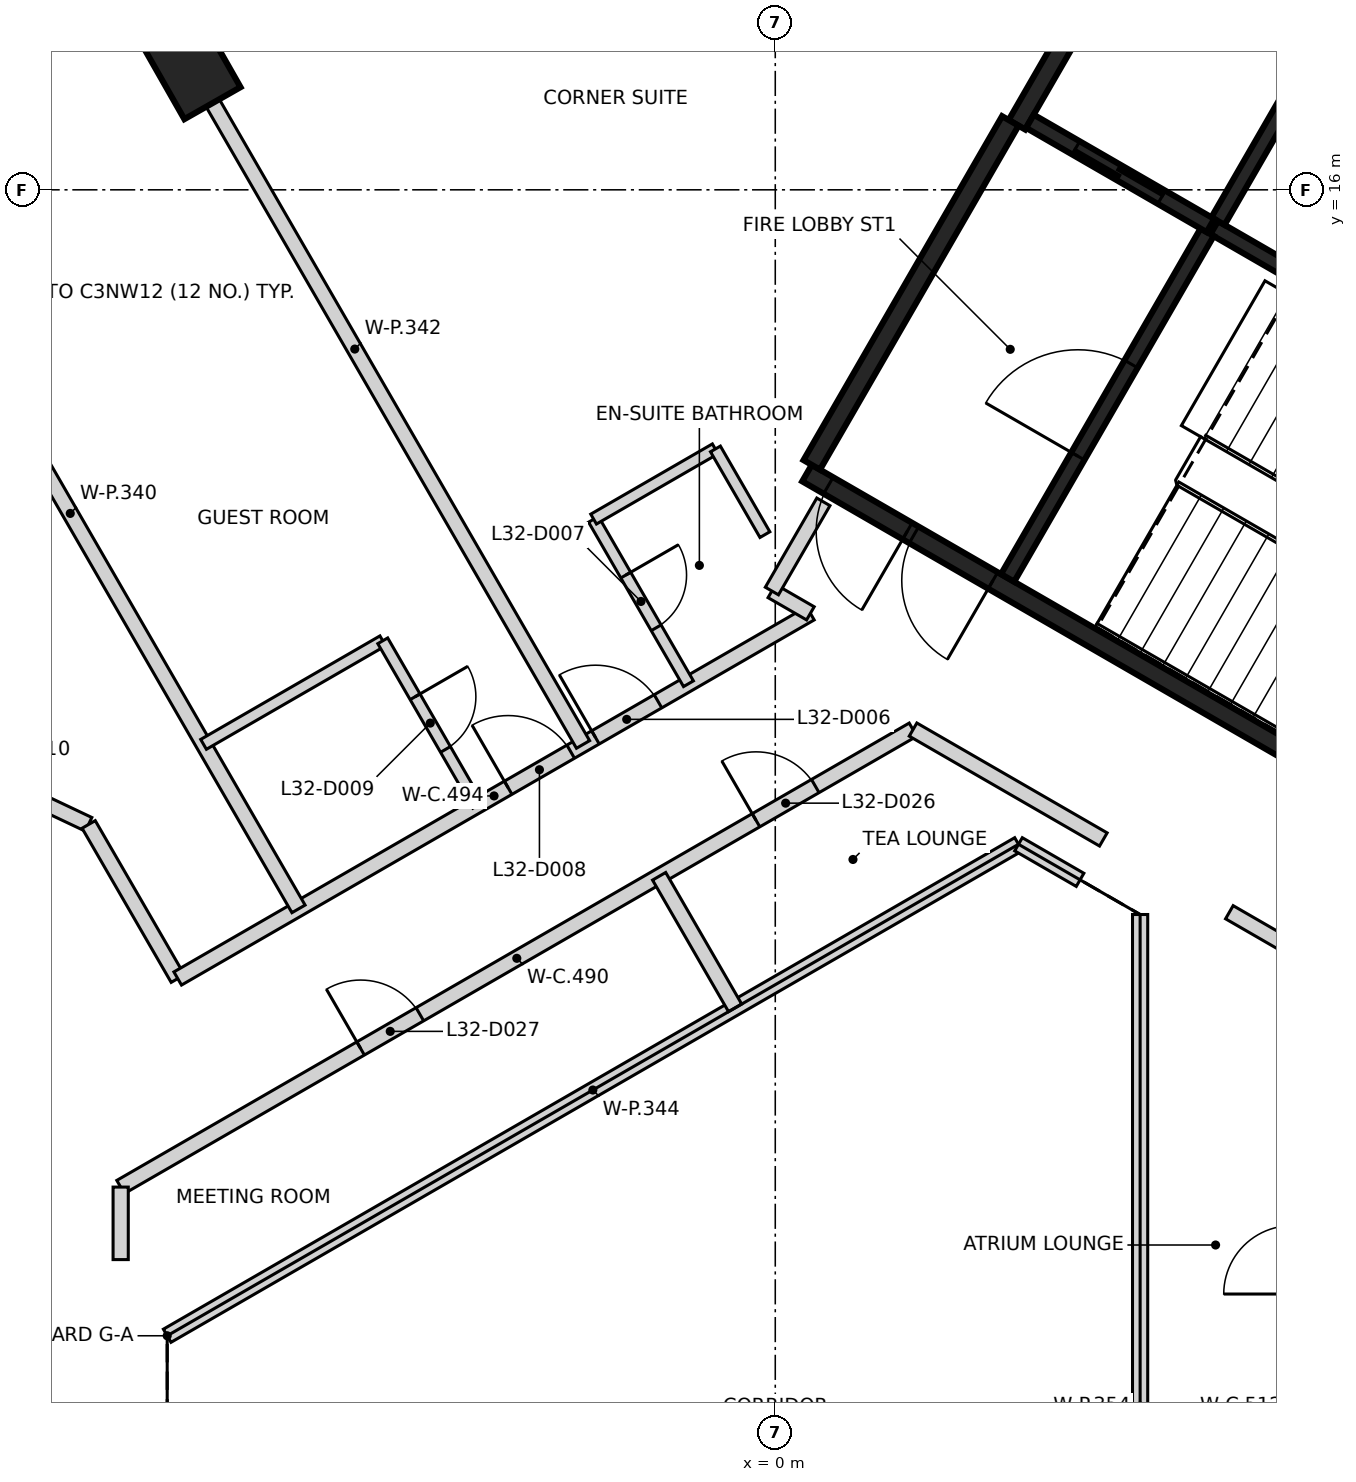
"""IFC4 building model, lengths in metres.
Left out: names, types, materials, properties, quantities, classifications, styles, units other than length and angle.
Written with IfcOpenShell. Run it as: python <this file> out.ifc"""

import sys

from ifc_helpers import new_model, si_unit, direction, frame, frame_2d, origin, origin_2d, place, context, subcontext, project, spatial, rectangle, extrude, element, fill, save


model = new_model("IFC4")
c1 = context("Model", 3, precision=1e-05, world=origin(), true_north=direction((0.0, 1.0)))
c2 = subcontext(c1, "Body", "Model", "MODEL_VIEW")
j1 = project(units=[si_unit("LENGTHUNIT", "METRE"), si_unit("PLANEANGLEUNIT", "RADIAN")], contexts=[c1])
p1 = place(None, origin())
s1 = spatial("IfcSite", under=j1, at=p1, CompositionType="ELEMENT")
p2 = place(p1, origin())
s2 = spatial("IfcBuilding", under=s1, at=p2, CompositionType="ELEMENT")
p3 = place(p2, frame((0.0, 0.0, 132.4)))
s3 = spatial("IfcBuildingStorey", under=s2, at=p3, CompositionType="ELEMENT", Elevation=132.4)
p4 = place(p3, frame((-7.714, 17.683, -0.4), z_axis=(0.0, 0.0, 1.0), x_axis=(-0.494656467983, 0.869088590813, 0.0)))
e1 = element("IfcColumn", 1, at=p4, inside=s3, PredefinedType="COLUMN", context=c2, shape_type="SweptSolid", body=[
    extrude(rectangle(XDim=1.25, YDim=0.85, at=origin_2d()), origin(), (0.0, 0.0, 1.0), 3.6),
])
p5 = place(p3, frame((10.42, 6.498, 0.0), z_axis=(0.0, 0.0, 1.0), x_axis=(-0.866021906294, 0.500006057782, 0.0)))
e2 = element("IfcWall", 2, at=p5, inside=s3, PredefinedType="SHEAR", context=c2, shape_type="SweptSolid", body=[
    extrude(rectangle(XDim=11.55, YDim=0.25, at=frame_2d((5.775, 0.0))), origin(), (0.0, 0.0, 1.0), 3.2),
])
p6 = place(p5, frame((10.025, 0.0, 0.0)))
e3 = element("IfcOpeningElement", 3, at=p6, cuts=e2, PredefinedType="OPENING", context=c2, shape_type="SweptSolid", body=[
    extrude(rectangle(XDim=1.2, YDim=2.1, at=frame_2d((0.6, 1.05))), frame((0.0, 0.135, 0.0), z_axis=(0.0, -1.0, 0.0), x_axis=(1.0, 0.0, 0.0)), (0.0, 0.0, 1.0), 0.27),
])
p7 = place(p5, frame((8.725, 0.0, 0.0)))
e4 = element("IfcOpeningElement", 4, at=p7, cuts=e2, PredefinedType="OPENING", context=c2, shape_type="SweptSolid", body=[
    extrude(rectangle(XDim=1.2, YDim=2.1, at=frame_2d((0.6, 1.05))), frame((0.0, 0.135, 0.0), z_axis=(0.0, -1.0, 0.0), x_axis=(1.0, 0.0, 0.0)), (0.0, 0.0, 1.0), 0.27),
])
p8 = place(p3, frame((3.179, 16.856, 0.0), z_axis=(0.0, 0.0, 1.0), x_axis=(0.500004234368, 0.866022959057, 0.0)))
e5 = element("IfcWall", 5, at=p8, inside=s3, PredefinedType="SHEAR", context=c2, shape_type="SweptSolid", body=[
    extrude(rectangle(XDim=6.25, YDim=0.25, at=frame_2d((3.125, 0.0))), origin(), (0.0, 0.0, 1.0), 3.2),
])
p9 = place(p3, frame((0.48, 12.381, 0.0), z_axis=(0.0, 0.0, 1.0), x_axis=(0.49999885962, 0.866026062182, 0.0)))
e6 = element("IfcWall", 6, at=p9, inside=s3, PredefinedType="SHEAR", context=c2, shape_type="SweptSolid", body=[
    extrude(rectangle(XDim=5.225, YDim=0.25, at=frame_2d((2.612, 0.0))), origin(), (0.0, 0.0, 1.0), 3.2),
])
p10 = place(p3, frame((5.775, 15.502, 0.0), z_axis=(0.0, 0.0, 1.0), x_axis=(0.866020080793, -0.500009219579, 0.0)))
e7 = element("IfcWall", 7, at=p10, inside=s3, PredefinedType="SHEAR", context=c2, shape_type="SweptSolid", body=[
    extrude(rectangle(XDim=5.699, YDim=0.2, at=frame_2d((2.85, 0.0))), origin(), (0.0, 0.0, 1.0), 3.2),
])
p11 = place(p3, frame((3.057, 10.895, 0.0), z_axis=(0.0, 0.0, 1.0), x_axis=(0.499989418164, 0.866031513124, 0.0)))
e8 = element("IfcWall", 8, at=p11, inside=s3, PredefinedType="SHEAR", context=c2, shape_type="SweptSolid", body=[
    extrude(rectangle(XDim=5.251, YDim=0.2, at=frame_2d((2.625, 0.0))), origin(), (0.0, 0.0, 1.0), 3.2),
])
p12 = place(p11, frame((1.849, 0.0, 0.0)))
e9 = element("IfcOpeningElement", 9, at=p12, cuts=e8, PredefinedType="OPENING", context=c2, shape_type="SweptSolid", body=[
    extrude(rectangle(XDim=1.4, YDim=2.1, at=frame_2d((0.7, 1.05))), frame((0.0, 0.11, 0.0), z_axis=(0.0, -1.0, 0.0), x_axis=(1.0, 0.0, 0.0)), (0.0, 0.0, 1.0), 0.22),
])
p13 = place(p3, frame((7.199, 17.97, 0.0), z_axis=(0.0, 0.0, 1.0), x_axis=(-0.499968400327, -0.866043647095, 0.0)))
e10 = element("IfcWall", 10, at=p13, inside=s3, PredefinedType="SHEAR", context=c2, shape_type="SweptSolid", body=[
    extrude(rectangle(XDim=2.75, YDim=0.2, at=frame_2d((1.375, 0.0))), origin(), (0.0, 0.0, 1.0), 3.2),
])
p14 = place(p3, frame((5.725, 15.531, 0.0), z_axis=(0.0, 0.0, 1.0), x_axis=(-0.866037306777, 0.499979382845, 0.0)))
e11 = element("IfcWall", 11, at=p14, inside=s3, PredefinedType="SHEAR", context=c2, shape_type="SweptSolid", body=[
    extrude(rectangle(XDim=2.742, YDim=0.2, at=frame_2d((1.371, 0.0))), origin(), (0.0, 0.0, 1.0), 3.2),
])
p15 = place(p14, frame((0.743, 0.0, 0.0)))
e12 = element("IfcOpeningElement", 12, at=p15, cuts=e11, PredefinedType="OPENING", context=c2, shape_type="SweptSolid", body=[
    extrude(rectangle(XDim=1.3, YDim=2.1, at=frame_2d((0.65, 1.05))), frame((0.0, 0.11, 0.0), z_axis=(0.0, -1.0, 0.0), x_axis=(1.0, 0.0, 0.0)), (0.0, 0.0, 1.0), 0.22),
])
p16 = place(p3, frame((-10.141, 8.176, 0.0), z_axis=(0.0, 0.0, 1.0), x_axis=(0.903904169039, -0.427735026849, 0.0)))
e13 = element("IfcWall", 13, at=p16, inside=s3, PredefinedType="PARTITIONING", context=c2, shape_type="SweptSolid", body=[
    extrude(rectangle(XDim=1.225, YDim=0.2, at=frame_2d((0.612, 0.0))), origin(), (0.0, 0.0, 1.0), 3.2),
])
p17 = place(p3, frame((-9.033, 7.651, 0.0), z_axis=(0.0, 0.0, 1.0), x_axis=(0.500354010599, -0.865820919173, 0.0)))
e14 = element("IfcWall", 14, at=p17, inside=s3, PredefinedType="PARTITIONING", context=c2, shape_type="SweptSolid", body=[
    extrude(rectangle(XDim=2.342, YDim=0.2, at=frame_2d((1.171, 0.0))), origin(), (0.0, 0.0, 1.0), 3.2),
])
p18 = place(p3, frame((-8.613, 2.881, 0.0), z_axis=(0.0, 0.0, 1.0), x_axis=(0.866103179807, 0.499865263774, 0.0)))
e15 = element("IfcWall", 15, at=p18, inside=s3, PredefinedType="PARTITIONING", context=c2, shape_type="SweptSolid", body=[
    extrude(rectangle(XDim=12.036, YDim=0.2, at=frame_2d((6.018, 0.0))), origin(), (0.0, 0.0, 1.0), 3.2),
])
p19 = place(p18, frame((9.652, 0.0, 0.0)))
e16 = element("IfcOpeningElement", 16, at=p19, cuts=e15, PredefinedType="OPENING", context=c2, shape_type="SweptSolid", body=[
    extrude(rectangle(XDim=0.9, YDim=2.1, at=frame_2d((0.45, 1.05))), frame((0.0, 0.11, 0.0), z_axis=(0.0, -1.0, 0.0), x_axis=(1.0, 0.0, 0.0)), (0.0, 0.0, 1.0), 0.22),
])
p20 = place(p18, frame((3.646, 0.0, 0.0)))
e17 = element("IfcOpeningElement", 17, at=p20, cuts=e15, PredefinedType="OPENING", context=c2, shape_type="SweptSolid", body=[
    extrude(rectangle(XDim=0.9, YDim=2.1, at=frame_2d((0.45, 1.05))), frame((0.0, 0.11, 0.0), z_axis=(0.0, -1.0, 0.0), x_axis=(1.0, 0.0, 0.0)), (0.0, 0.0, 1.0), 0.22),
])
p21 = place(p3, frame((-8.612, 1.926, 0.0), z_axis=(0.0, 0.0, 1.0), x_axis=(0.0, 1.0, 0.0)))
e18 = element("IfcWall", 18, at=p21, inside=s3, PredefinedType="PARTITIONING", context=c2, shape_type="SweptSolid", body=[
    extrude(rectangle(XDim=0.954, YDim=0.2, at=frame_2d((0.477, 0.0))), origin(), (0.0, 0.0, 1.0), 3.2),
])
p22 = place(p3, frame((-7.862, 5.624, 0.0), z_axis=(0.0, 0.0, 1.0), x_axis=(0.866109024618, 0.499855136491, 0.0)))
e19 = element("IfcWall", 19, at=p22, inside=s3, PredefinedType="PARTITIONING", context=c2, shape_type="SweptSolid", body=[
    extrude(rectangle(XDim=9.61, YDim=0.2, at=frame_2d((4.805, 0.0))), origin(), (0.0, 0.0, 1.0), 3.2),
])
p23 = place(p22, frame((6.345, 0.0, 0.0)))
e20 = element("IfcOpeningElement", 20, at=p23, cuts=e19, PredefinedType="OPENING", context=c2, shape_type="SweptSolid", body=[
    extrude(rectangle(XDim=0.95, YDim=2.1, at=frame_2d((0.475, 1.05))), frame((0.0, 0.11, 0.0), z_axis=(0.0, -1.0, 0.0), x_axis=(1.0, 0.0, 0.0)), (0.0, 0.0, 1.0), 0.22),
])
p24 = place(p22, frame((5.02, 0.0, 0.0)))
e21 = element("IfcOpeningElement", 21, at=p24, cuts=e19, PredefinedType="OPENING", context=c2, shape_type="SweptSolid", body=[
    extrude(rectangle(XDim=0.95, YDim=2.1, at=frame_2d((0.475, 1.05))), frame((0.0, 0.11, 0.0), z_axis=(0.0, -1.0, 0.0), x_axis=(1.0, 0.0, 0.0)), (0.0, 0.0, 1.0), 0.22),
])
p25 = place(p3, frame((-0.045, 10.721, 0.0), z_axis=(0.0, 0.0, 1.0), x_axis=(0.865768710998, -0.500444341617, 0.0)))
e22 = element("IfcWall", 22, at=p25, inside=s3, PredefinedType="PARTITIONING", context=c2, shape_type="SweptSolid", body=[
    extrude(rectangle(XDim=0.585, YDim=0.2, at=frame_2d((0.293, 0.0))), origin(), (0.0, 0.0, 1.0), 3.2),
])
p26 = place(p3, frame((-0.044, 10.722, 0.0), z_axis=(0.0, 0.0, 1.0), x_axis=(0.500034408226, 0.866005537274, 0.0)))
e23 = element("IfcWall", 23, at=p26, inside=s3, PredefinedType="PARTITIONING", context=c2, shape_type="SweptSolid", body=[
    extrude(rectangle(XDim=1.355, YDim=0.2, at=frame_2d((0.677, 0.0))), origin(), (0.0, 0.0, 1.0), 3.2),
])
p27 = place(p3, frame((1.813, 8.899, 0.0), z_axis=(0.0, 0.0, 1.0), x_axis=(0.865957732194, -0.50011719232, 0.0)))
e24 = element("IfcWall", 24, at=p27, inside=s3, PredefinedType="PARTITIONING", context=c2, shape_type="SweptSolid", body=[
    extrude(rectangle(XDim=2.891, YDim=0.2, at=frame_2d((1.445, 0.0))), origin(), (0.0, 0.0, 1.0), 2.3),
])
p28 = place(p3, frame((5.974, 6.496, 0.0), z_axis=(0.0, 0.0, 1.0), x_axis=(0.865934055563, -0.500158186394, 0.0)))
e25 = element("IfcWall", 25, at=p28, inside=s3, PredefinedType="PARTITIONING", context=c2, shape_type="SweptSolid", body=[
    extrude(rectangle(XDim=0.954, YDim=0.2, at=frame_2d((0.477, 0.0))), origin(), (0.0, 0.0, 1.0), 3.2),
])
p29 = place(p3, frame((-12.279, 16.946, 0.0), z_axis=(0.0, 0.0, 1.0), x_axis=(0.499902454835, -0.866081714187, 0.0)))
e26 = element("IfcWall", 26, at=p29, inside=s3, PredefinedType="PARTITIONING", context=c2, shape_type="SweptSolid", body=[
    extrude(rectangle(XDim=12.015, YDim=0.2, at=frame_2d((6.008, 0.0))), origin(), (0.0, 0.0, 1.0), 3.2),
])
p30 = place(p3, frame((-8.535, 19.107, 0.0), z_axis=(0.0, 0.0, 1.0), x_axis=(0.499972843048, -0.86604108229, 0.0)))
e27 = element("IfcWall", 27, at=p30, inside=s3, PredefinedType="PARTITIONING", context=c2, shape_type="SweptSolid", body=[
    extrude(rectangle(XDim=12.013, YDim=0.2, at=frame_2d((6.007, 0.0))), origin(), (0.0, 0.0, 1.0), 3.2),
])
p31 = place(p3, frame((-8.0, 0.924, 0.0), z_axis=(0.0, 0.0, 1.0), x_axis=(0.86604129137, 0.499972480886, 0.0)))
e28 = element("IfcWall", 28, at=p31, inside=s3, PredefinedType="PARTITIONING", context=c2, shape_type="SweptSolid", body=[
    extrude(rectangle(XDim=12.932, YDim=0.2, at=frame_2d((6.466, 0.0))), origin(), (0.0, 0.0, 1.0), 2.3),
])
p32 = place(p3, frame((-1.528, 6.969, 0.0), z_axis=(0.0, 0.0, 1.0), x_axis=(0.500000846469, -0.866024915075, 0.0)))
e29 = element("IfcWall", 29, at=p32, inside=s3, PredefinedType="PARTITIONING", context=c2, shape_type="SweptSolid", body=[
    extrude(rectangle(XDim=1.999, YDim=0.2, at=frame_2d((1.0, 0.0))), origin(), (0.0, 0.0, 1.0), 3.2),
])
p33 = place(p3, frame((3.2, 7.39, 0.0), z_axis=(0.0, 0.0, 1.0), x_axis=(0.865985641702, -0.500068863623, 0.0)))
e30 = element("IfcWall", 30, at=p33, inside=s3, PredefinedType="PARTITIONING", context=c2, shape_type="SweptSolid", body=[
    extrude(rectangle(XDim=0.935, YDim=0.2, at=frame_2d((0.468, 0.0))), origin(), (0.0, 0.0, 1.0), 2.3),
])
p34 = place(p3, frame((4.8, -6.466, 0.0), z_axis=(0.0, 0.0, 1.0), x_axis=(0.0, 1.0, 0.0)))
e31 = element("IfcWall", 31, at=p34, inside=s3, PredefinedType="PARTITIONING", context=c2, shape_type="SweptSolid", body=[
    extrude(rectangle(XDim=12.932, YDim=0.2, at=frame_2d((6.466, 0.0))), origin(), (0.0, 0.0, 1.0), 2.3),
])
p35 = place(p3, frame((-7.522, 8.704, 0.0), z_axis=(0.0, 0.0, 1.0), x_axis=(0.865972067821, 0.500092369221, 0.0)))
e32 = element("IfcWall", 32, at=p35, inside=s3, PredefinedType="PARTITIONING", context=c2, shape_type="SweptSolid", body=[
    extrude(rectangle(XDim=2.723, YDim=0.15, at=frame_2d((1.362, 0.0))), origin(), (0.0, 0.0, 1.0), 3.2),
])
p36 = place(p3, frame((-5.164, 10.067, 0.0), z_axis=(0.0, 0.0, 1.0), x_axis=(0.500046524342, -0.865998541277, 0.0)))
e33 = element("IfcWall", 33, at=p36, inside=s3, PredefinedType="PARTITIONING", context=c2, shape_type="SweptSolid", body=[
    extrude(rectangle(XDim=2.5, YDim=0.15, at=frame_2d((1.25, 0.0))), origin(), (0.0, 0.0, 1.0), 3.2),
])
p37 = place(p36, frame((0.85, 0.0, 0.0)))
e34 = element("IfcOpeningElement", 34, at=p37, cuts=e33, PredefinedType="OPENING", context=c2, shape_type="SweptSolid", body=[
    extrude(rectangle(XDim=0.8, YDim=2.1, at=frame_2d((0.4, 1.05))), frame((0.0, 0.085, 0.0), z_axis=(0.0, -1.0, 0.0), x_axis=(1.0, 0.0, 0.0)), (0.0, 0.0, 1.0), 0.17),
])
p38 = place(p3, frame((-2.391, 11.665, 0.0), z_axis=(0.0, 0.0, 1.0), x_axis=(0.500049599607, -0.865996765544, 0.0)))
e35 = element("IfcWall", 35, at=p38, inside=s3, PredefinedType="PARTITIONING", context=c2, shape_type="SweptSolid", body=[
    extrude(rectangle(XDim=2.498, YDim=0.15, at=frame_2d((1.249, 0.0))), origin(), (0.0, 0.0, 1.0), 3.2),
])
p39 = place(p38, frame((0.848, 0.0, 0.0)))
e36 = element("IfcOpeningElement", 36, at=p39, cuts=e35, PredefinedType="OPENING", context=c2, shape_type="SweptSolid", body=[
    extrude(rectangle(XDim=0.8, YDim=2.1, at=frame_2d((0.4, 1.05))), frame((0.0, 0.085, 0.0), z_axis=(0.0, -1.0, 0.0), x_axis=(1.0, 0.0, 0.0)), (0.0, 0.0, 1.0), 0.17),
])
p40 = place(p3, frame((-2.39, 11.668, 0.0), z_axis=(0.0, 0.0, 1.0), x_axis=(0.865932482239, 0.500160910312, 0.0)))
e37 = element("IfcWall", 37, at=p40, inside=s3, PredefinedType="PARTITIONING", context=c2, shape_type="SweptSolid", body=[
    extrude(rectangle(XDim=1.848, YDim=0.15, at=frame_2d((0.924, 0.0))), origin(), (0.0, 0.0, 1.0), 3.2),
])
p41 = place(p3, frame((-0.787, 12.591, 0.0), z_axis=(0.0, 0.0, 1.0), x_axis=(0.499749509877, -0.866169976031, 0.0)))
e38 = element("IfcWall", 38, at=p41, inside=s3, PredefinedType="PARTITIONING", context=c2, shape_type="SweptSolid", body=[
    extrude(rectangle(XDim=1.302, YDim=0.15, at=frame_2d((0.651, 0.0))), origin(), (0.0, 0.0, 1.0), 3.2),
])
p42 = place(p15, origin())
e39 = element("IfcDoor", 39, at=p42, inside=s3, OperationType="SLIDING_TO_RIGHT", PredefinedType="DOOR", context=c2, shape_type="SweptSolid", body=[
    extrude(rectangle(XDim=1.3, YDim=2.1, at=frame_2d((0.65, 1.05))), frame((0.0, 0.025, 0.0), z_axis=(0.0, -1.0, 0.0), x_axis=(1.0, 0.0, 0.0)), (0.0, 0.0, 1.0), 0.05),
])
fill(e12, e39)
p43 = place(p6, origin())
e40 = element("IfcDoor", 40, at=p43, inside=s3, OperationType="SINGLE_SWING_LEFT", PredefinedType="DOOR", context=c2, shape_type="SweptSolid", body=[
    extrude(rectangle(XDim=1.2, YDim=2.1, at=frame_2d((0.6, 1.05))), frame((0.0, 0.025, 0.0), z_axis=(0.0, -1.0, 0.0), x_axis=(1.0, 0.0, 0.0)), (0.0, 0.0, 1.0), 0.05),
])
fill(e3, e40)
p44 = place(p7, origin())
e41 = element("IfcDoor", 41, at=p44, inside=s3, OperationType="SINGLE_SWING_RIGHT", PredefinedType="DOOR", context=c2, shape_type="SweptSolid", body=[
    extrude(rectangle(XDim=1.2, YDim=2.1, at=frame_2d((0.6, 1.05))), frame((0.0, 0.025, 0.0), z_axis=(0.0, -1.0, 0.0), x_axis=(1.0, 0.0, 0.0)), (0.0, 0.0, 1.0), 0.05),
])
fill(e4, e41)
p45 = place(p12, origin())
e42 = element("IfcDoor", 42, at=p45, inside=s3, OperationType="SINGLE_SWING_RIGHT", PredefinedType="DOOR", context=c2, shape_type="SweptSolid", body=[
    extrude(rectangle(XDim=1.4, YDim=2.1, at=frame_2d((0.7, 1.05))), frame((0.0, 0.025, 0.0), z_axis=(0.0, -1.0, 0.0), x_axis=(1.0, 0.0, 0.0)), (0.0, 0.0, 1.0), 0.05),
])
fill(e9, e42)
p46 = place(p23, origin())
e43 = element("IfcDoor", 43, at=p46, inside=s3, OperationType="SINGLE_SWING_LEFT", PredefinedType="DOOR", context=c2, shape_type="SweptSolid", body=[
    extrude(rectangle(XDim=0.95, YDim=2.1, at=frame_2d((0.475, 1.05))), frame((0.0, 0.025, 0.0), z_axis=(0.0, -1.0, 0.0), x_axis=(1.0, 0.0, 0.0)), (0.0, 0.0, 1.0), 0.05),
])
fill(e20, e43)
p47 = place(p39, origin())
e44 = element("IfcDoor", 44, at=p47, inside=s3, OperationType="SINGLE_SWING_LEFT", PredefinedType="DOOR", context=c2, shape_type="SweptSolid", body=[
    extrude(rectangle(XDim=0.8, YDim=2.1, at=frame_2d((0.4, 1.05))), frame((0.0, 0.025, 0.0), z_axis=(0.0, -1.0, 0.0), x_axis=(1.0, 0.0, 0.0)), (0.0, 0.0, 1.0), 0.05),
])
fill(e36, e44)
p48 = place(p24, origin())
e45 = element("IfcDoor", 45, at=p48, inside=s3, OperationType="SINGLE_SWING_LEFT", PredefinedType="DOOR", context=c2, shape_type="SweptSolid", body=[
    extrude(rectangle(XDim=0.95, YDim=2.1, at=frame_2d((0.475, 1.05))), frame((0.0, 0.025, 0.0), z_axis=(0.0, -1.0, 0.0), x_axis=(1.0, 0.0, 0.0)), (0.0, 0.0, 1.0), 0.05),
])
fill(e21, e45)
p49 = place(p37, frame((0.8, 0.0, 0.0), z_axis=(0.0, 0.0, 1.0), x_axis=(-1.0, 0.0, 0.0)))
e46 = element("IfcDoor", 46, at=p49, inside=s3, OperationType="SINGLE_SWING_LEFT", PredefinedType="DOOR", context=c2, shape_type="SweptSolid", body=[
    extrude(rectangle(XDim=0.8, YDim=2.1, at=frame_2d((0.4, 1.05))), frame((0.0, 0.025, 0.0), z_axis=(0.0, -1.0, 0.0), x_axis=(1.0, 0.0, 0.0)), (0.0, 0.0, 1.0), 0.05),
])
fill(e34, e46)
p50 = place(p19, frame((0.9, 0.0, 0.0), z_axis=(0.0, 0.0, 1.0), x_axis=(-1.0, 0.0, 0.0)))
e47 = element("IfcDoor", 47, at=p50, inside=s3, OperationType="SINGLE_SWING_LEFT", PredefinedType="DOOR", context=c2, shape_type="SweptSolid", body=[
    extrude(rectangle(XDim=0.9, YDim=2.1, at=frame_2d((0.45, 1.05))), frame((0.0, 0.025, 0.0), z_axis=(0.0, -1.0, 0.0), x_axis=(1.0, 0.0, 0.0)), (0.0, 0.0, 1.0), 0.05),
])
fill(e16, e47)
p51 = place(p20, frame((0.9, 0.0, 0.0), z_axis=(0.0, 0.0, 1.0), x_axis=(-1.0, 0.0, 0.0)))
e48 = element("IfcDoor", 48, at=p51, inside=s3, OperationType="SINGLE_SWING_LEFT", PredefinedType="DOOR", context=c2, shape_type="SweptSolid", body=[
    extrude(rectangle(XDim=0.9, YDim=2.1, at=frame_2d((0.45, 1.05))), frame((0.0, 0.025, 0.0), z_axis=(0.0, -1.0, 0.0), x_axis=(1.0, 0.0, 0.0)), (0.0, 0.0, 1.0), 0.05),
])
fill(e17, e48)
save(model, sys.argv[1])
